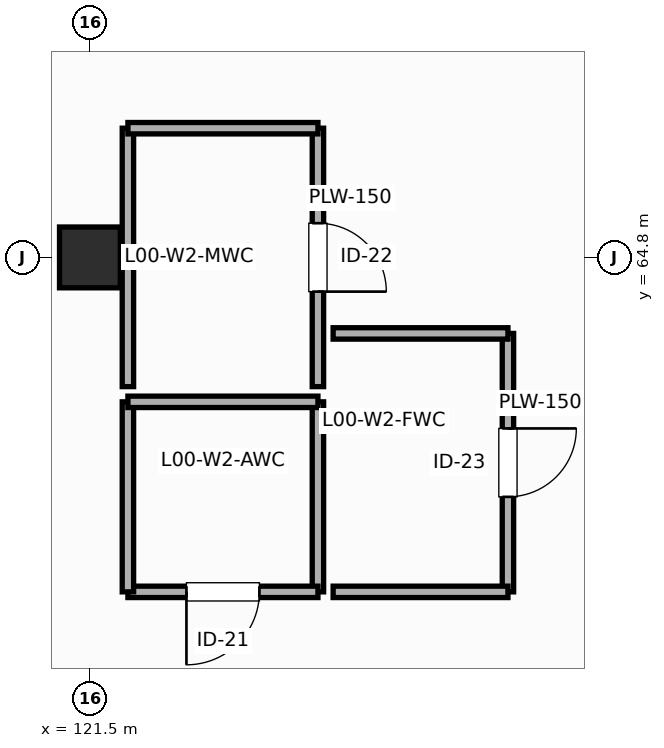
"""IFC4 building model, lengths in metres.
Left out: names, types, materials, properties, quantities, classifications, styles, units other than length and angle.
Written with IfcOpenShell. Run it as: python <this file> out.ifc"""

import sys

from ifc_helpers import new_model, si_unit, direction, frame, frame_2d, origin, origin_2d, place, context, subcontext, project, spatial, rectangle, extrude, element, fill, save


model = new_model("IFC4")
c1 = context("Model", 3, precision=1e-05, world=origin(), true_north=direction((0.0, 1.0)))
c2 = subcontext(c1, "Body", "Model", "MODEL_VIEW")
j1 = project(units=[si_unit("LENGTHUNIT", "METRE"), si_unit("PLANEANGLEUNIT", "RADIAN")], contexts=[c1])
p1 = place(None, origin())
s1 = spatial("IfcSite", under=j1, at=p1, CompositionType="ELEMENT")
p2 = place(p1, origin())
s2 = spatial("IfcBuilding", under=s1, at=p2, CompositionType="ELEMENT")
p3 = place(p2, origin())
s3 = spatial("IfcBuildingStorey", under=s2, at=p3, CompositionType="ELEMENT", Elevation=0.0)
p4 = place(p3, frame((121.5, 64.8, 0.0), z_axis=(0.0, 0.0, 1.0), x_axis=(1.0, 0.0, 0.0)))
e1 = element("IfcColumn", 1, at=p4, inside=s3, PredefinedType="COLUMN", context=c2, shape_type="SweptSolid", body=[
    extrude(rectangle(XDim=0.8, YDim=0.8, at=origin_2d()), origin(), (0.0, 0.0, 1.0), 5.4),
])
p5 = place(p3, frame((124.5, 62.9, 0.0), z_axis=(0.0, 0.0, 1.0), x_axis=(0.0, -1.0, 0.0)))
e2 = element("IfcWall", 2, at=p5, inside=s3, PredefinedType="PLUMBINGWALL", context=c2, shape_type="SweptSolid", body=[
    extrude(rectangle(XDim=2.5, YDim=0.15, at=frame_2d((1.25, 0.0))), origin(), (0.0, 0.0, 1.0), 5.12),
])
p6 = place(p3, frame((124.5, 60.4, 0.0), z_axis=(0.0, 0.0, 1.0), x_axis=(-1.0, 0.0, 0.0)))
e3 = element("IfcWall", 3, at=p6, inside=s3, PredefinedType="PLUMBINGWALL", context=c2, shape_type="SweptSolid", body=[
    extrude(rectangle(XDim=2.5, YDim=0.15, at=frame_2d((1.25, 0.0))), origin(), (0.0, 0.0, 1.0), 5.12),
])
p7 = place(p6, frame((0.77, 0.0, 0.0)))
e4 = element("IfcOpeningElement", 4, at=p7, cuts=e3, PredefinedType="OPENING", context=c2, shape_type="SweptSolid", body=[
    extrude(rectangle(XDim=0.96, YDim=2.16, at=frame_2d((0.48, 1.08))), frame((0.0, 0.085, 0.0), z_axis=(0.0, -1.0, 0.0), x_axis=(1.0, 0.0, 0.0)), (0.0, 0.0, 1.0), 0.17),
])
for number, where, z_axis, x_axis in (
    (5, (122.0, 60.4, 0.0), (0.0, 0.0, 1.0), (0.0, 1.0, 0.0)),
    (6, (122.0, 62.9, 0.0), (0.0, 0.0, 1.0), (1.0, 0.0, 0.0)),
):
    element("IfcWall", number, at=place(p3, frame(where, z_axis=z_axis, x_axis=x_axis)), inside=s3, PredefinedType="PLUMBINGWALL", context=c2, shape_type="SweptSolid", body=[
        extrude(rectangle(XDim=2.5, YDim=0.15, at=frame_2d((1.25, 0.0))), origin(), (0.0, 0.0, 1.0), 5.12),
    ])
p8 = place(p3, frame((127.0, 63.8, 0.0), z_axis=(0.0, 0.0, 1.0), x_axis=(0.0, -1.0, 0.0)))
e7 = element("IfcWall", 7, at=p8, inside=s3, PredefinedType="PLUMBINGWALL", context=c2, shape_type="SweptSolid", body=[
    extrude(rectangle(XDim=3.4, YDim=0.15, at=frame_2d((1.7, 0.0))), origin(), (0.0, 0.0, 1.0), 5.12),
])
p9 = place(p8, frame((1.25, 0.0, 0.0)))
e8 = element("IfcOpeningElement", 8, at=p9, cuts=e7, PredefinedType="OPENING", context=c2, shape_type="SweptSolid", body=[
    extrude(rectangle(XDim=0.9, YDim=2.2, at=frame_2d((0.45, 1.1))), frame((0.0, 0.085, 0.0), z_axis=(0.0, -1.0, 0.0), x_axis=(1.0, 0.0, 0.0)), (0.0, 0.0, 1.0), 0.17),
])
for number, where, z_axis, x_axis in (
    (9, (127.0, 60.4, 0.0), (0.0, 0.0, 1.0), (-1.0, 0.0, 0.0)),
    (10, (124.7, 63.8, 0.0), (0.0, 0.0, 1.0), (1.0, 0.0, 0.0)),
):
    element("IfcWall", number, at=place(p3, frame(where, z_axis=z_axis, x_axis=x_axis)), inside=s3, PredefinedType="PLUMBINGWALL", context=c2, shape_type="SweptSolid", body=[
        extrude(rectangle(XDim=2.3, YDim=0.15, at=frame_2d((1.15, 0.0))), origin(), (0.0, 0.0, 1.0), 5.12),
    ])
p10 = place(p3, frame((124.5, 66.5, 0.0), z_axis=(0.0, 0.0, 1.0), x_axis=(0.0, -1.0, 0.0)))
e11 = element("IfcWall", 11, at=p10, inside=s3, PredefinedType="PLUMBINGWALL", context=c2, shape_type="SweptSolid", body=[
    extrude(rectangle(XDim=3.4, YDim=0.15, at=frame_2d((1.7, 0.0))), origin(), (0.0, 0.0, 1.0), 5.12),
])
p11 = place(p10, frame((1.25, 0.0, 0.0)))
e12 = element("IfcOpeningElement", 12, at=p11, cuts=e11, PredefinedType="OPENING", context=c2, shape_type="SweptSolid", body=[
    extrude(rectangle(XDim=0.9, YDim=2.1, at=frame_2d((0.45, 1.05))), frame((0.0, 0.085, 0.0), z_axis=(0.0, -1.0, 0.0), x_axis=(1.0, 0.0, 0.0)), (0.0, 0.0, 1.0), 0.17),
])
p12 = place(p3, frame((122.0, 63.1, 0.0), z_axis=(0.0, 0.0, 1.0), x_axis=(0.0, 1.0, 0.0)))
e13 = element("IfcWall", 13, at=p12, inside=s3, PredefinedType="PLUMBINGWALL", context=c2, shape_type="SweptSolid", body=[
    extrude(rectangle(XDim=3.4, YDim=0.15, at=frame_2d((1.7, 0.0))), origin(), (0.0, 0.0, 1.0), 5.12),
])
p13 = place(p3, frame((122.0, 66.5, 0.0), z_axis=(0.0, 0.0, 1.0), x_axis=(1.0, 0.0, 0.0)))
e14 = element("IfcWall", 14, at=p13, inside=s3, PredefinedType="PLUMBINGWALL", context=c2, shape_type="SweptSolid", body=[
    extrude(rectangle(XDim=2.5, YDim=0.15, at=frame_2d((1.25, 0.0))), origin(), (0.0, 0.0, 1.0), 5.12),
])
p14 = place(p7, origin())
e15 = element("IfcDoor", 15, at=p14, inside=s3, OperationType="SINGLE_SWING_RIGHT", PredefinedType="DOOR", context=c2, shape_type="SweptSolid", body=[
    extrude(rectangle(XDim=0.96, YDim=2.16, at=frame_2d((0.48, 1.08))), frame((0.0, 0.025, 0.0), z_axis=(0.0, -1.0, 0.0), x_axis=(1.0, 0.0, 0.0)), (0.0, 0.0, 1.0), 0.05),
])
fill(e4, e15)
p15 = place(p9, origin())
e16 = element("IfcDoor", 16, at=p15, inside=s3, OperationType="SINGLE_SWING_LEFT", PredefinedType="DOOR", context=c2, shape_type="SweptSolid", body=[
    extrude(rectangle(XDim=0.9, YDim=2.2, at=frame_2d((0.45, 1.1))), frame((0.0, 0.025, 0.0), z_axis=(0.0, -1.0, 0.0), x_axis=(1.0, 0.0, 0.0)), (0.0, 0.0, 1.0), 0.05),
])
fill(e8, e16)
p16 = place(p11, origin())
e17 = element("IfcDoor", 17, at=p16, inside=s3, OperationType="SINGLE_SWING_RIGHT", PredefinedType="DOOR", context=c2, shape_type="SweptSolid", body=[
    extrude(rectangle(XDim=0.9, YDim=2.1, at=frame_2d((0.45, 1.05))), frame((0.0, 0.025, 0.0), z_axis=(0.0, -1.0, 0.0), x_axis=(1.0, 0.0, 0.0)), (0.0, 0.0, 1.0), 0.05),
])
fill(e12, e17)
save(model, sys.argv[1])
